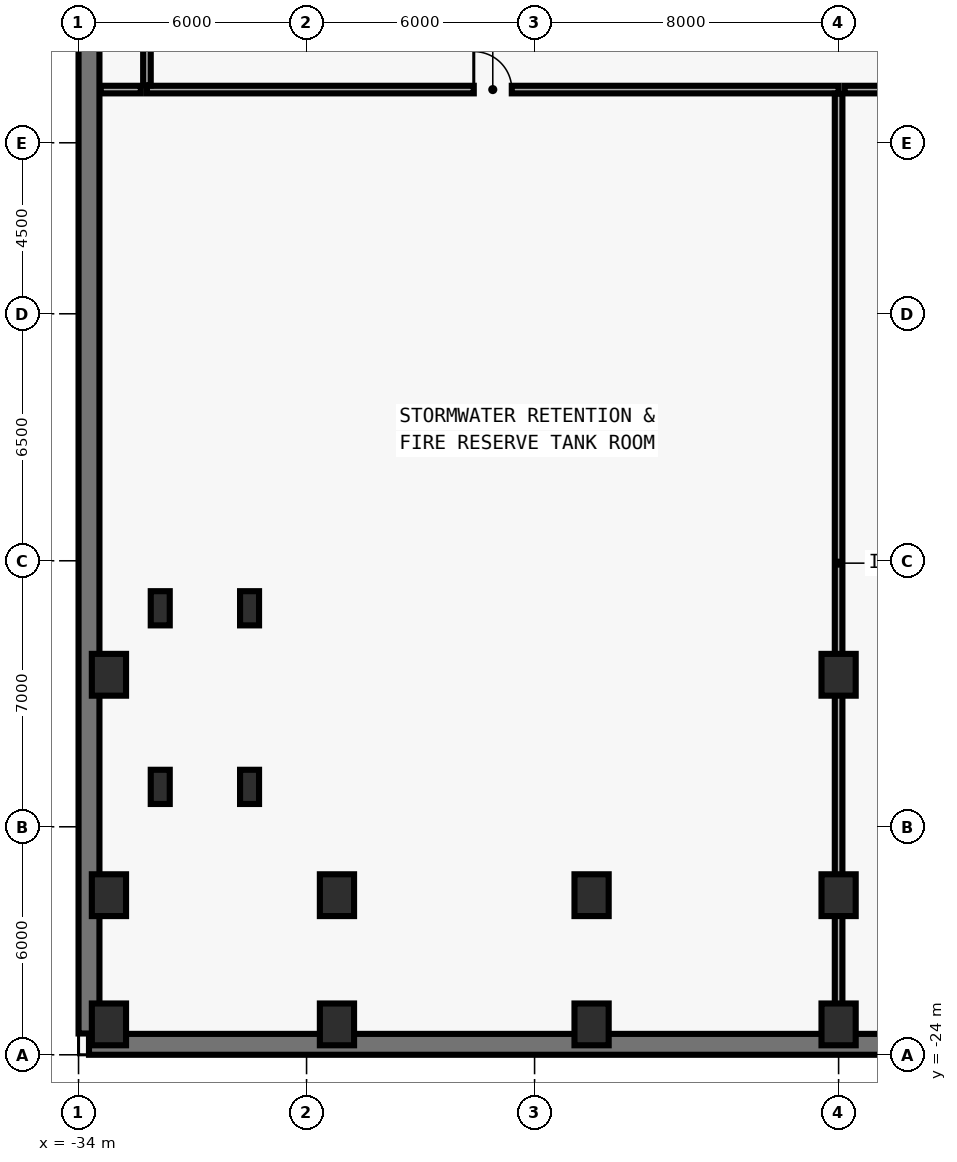
"""IFC4 building model, lengths in metres.
Left out: names, types, materials, properties, quantities, classifications, styles, units other than length and angle.
Written with IfcOpenShell. Run it as: python <this file> out.ifc"""

import sys

from ifc_helpers import new_model, si_unit, direction, frame, frame_2d, origin, origin_2d, place, context, subcontext, project, spatial, rectangle, extrude, element, fill, save


model = new_model("IFC4")
c1 = context("Model", 3, precision=1e-05, world=origin(), true_north=direction((0.0, 1.0)))
c2 = subcontext(c1, "Body", "Model", "MODEL_VIEW")
j1 = project(units=[si_unit("LENGTHUNIT", "METRE"), si_unit("PLANEANGLEUNIT", "RADIAN")], contexts=[c1])
p1 = place(None, origin())
s1 = spatial("IfcSite", under=j1, at=p1, CompositionType="ELEMENT")
p2 = place(p1, origin())
s2 = spatial("IfcBuilding", under=s1, at=p2, CompositionType="ELEMENT")
p3 = place(p2, frame((0.0, 0.0, -13.5)))
s3 = spatial("IfcBuildingStorey", under=s2, at=p3, CompositionType="ELEMENT", Elevation=-13.5)
p4 = place(p3, frame((-33.725, -23.725, 0.0), z_axis=(0.0, 0.0, 1.0), x_axis=(1.0, 0.0, 0.0)))
e1 = element("IfcWall", 1, at=p4, inside=s3, PredefinedType="SOLIDWALL", context=c2, shape_type="SweptSolid", body=[
    extrude(rectangle(XDim=67.45, YDim=0.55, at=frame_2d((33.725, 0.0))), origin(), (0.0, 0.0, 1.0), 4.492),
])
p5 = place(p3, frame((-33.725, -23.44, 0.0), z_axis=(0.0, 0.0, 1.0), x_axis=(0.0, 1.0, 0.0)))
e2 = element("IfcWall", 2, at=p5, inside=s3, PredefinedType="SOLIDWALL", context=c2, shape_type="SweptSolid", body=[
    extrude(rectangle(XDim=46.88, YDim=0.55, at=frame_2d((23.44, 0.0))), origin(), (0.0, 0.0, 1.0), 4.492),
])
for number, where, z_axis, x_axis in (
    (3, (-31.85, -16.95, 0.0), (0.0, 0.0, 1.0), (1.0, 0.0, 0.0)),
    (4, (-29.5, -16.95, 0.0), (0.0, 0.0, 1.0), (1.0, 0.0, 0.0)),
    (5, (-31.85, -12.25, 0.0), (0.0, 0.0, 1.0), (1.0, 0.0, 0.0)),
    (6, (-29.5, -12.25, 0.0), (0.0, 0.0, 1.0), (1.0, 0.0, 0.0)),
):
    element("IfcColumn", number, at=place(p3, frame(where, z_axis=z_axis, x_axis=x_axis)), inside=s3, PredefinedType="COLUMN", context=c2, shape_type="SweptSolid", body=[
        extrude(rectangle(XDim=0.5, YDim=0.9, at=origin_2d()), origin(), (0.0, 0.0, 1.0), 4.492),
    ])
for number, where, z_axis, x_axis in (
    (7, (-33.2, -23.2, 0.0), (0.0, 0.0, 1.0), (1.0, 0.0, 0.0)),
    (8, (-33.2, -19.8, 0.0), (0.0, 0.0, 1.0), (1.0, 0.0, 0.0)),
    (9, (-33.2, -14.0, 0.0), (0.0, 0.0, 1.0), (1.0, 0.0, 0.0)),
    (10, (-27.2, -23.2, 0.0), (0.0, 0.0, 1.0), (1.0, 0.0, 0.0)),
    (11, (-27.2, -19.8, 0.0), (0.0, 0.0, 1.0), (1.0, 0.0, 0.0)),
    (12, (-20.5, -23.2, 0.0), (0.0, 0.0, 1.0), (1.0, 0.0, 0.0)),
    (13, (-20.5, -19.8, 0.0), (0.0, 0.0, 1.0), (1.0, 0.0, 0.0)),
    (14, (-14.0, -23.2, 0.0), (0.0, 0.0, 1.0), (1.0, 0.0, 0.0)),
    (15, (-14.0, -19.8, 0.0), (0.0, 0.0, 1.0), (1.0, 0.0, 0.0)),
    (16, (-14.0, -14.0, 0.0), (0.0, 0.0, 1.0), (1.0, 0.0, 0.0)),
):
    element("IfcColumn", number, at=place(p3, frame(where, z_axis=z_axis, x_axis=x_axis)), inside=s3, PredefinedType="COLUMN", context=c2, shape_type="SweptSolid", body=[
        extrude(rectangle(XDim=0.9, YDim=1.1, at=origin_2d()), origin(), (0.0, 0.0, 1.0), 4.475),
    ])
p6 = place(p3, frame((-32.2, 1.4, 0.0), z_axis=(0.0, 0.0, 1.0), x_axis=(1.0, 0.0, 0.0)))
e17 = element("IfcWall", 17, at=p6, inside=s3, PredefinedType="MOVABLE", context=c2, shape_type="SweptSolid", body=[
    extrude(rectangle(XDim=18.2, YDim=0.2, at=frame_2d((9.1, 0.0))), origin(), (0.0, 0.0, 1.0), 4.18),
])
p7 = place(p6, frame((8.6, 0.0, 0.0)))
e18 = element("IfcOpeningElement", 18, at=p7, cuts=e17, PredefinedType="OPENING", context=c2, shape_type="SweptSolid", body=[
    extrude(rectangle(XDim=1.0, YDim=2.1, at=frame_2d((0.5, 1.05))), frame((0.0, 0.11, 0.0), z_axis=(0.0, -1.0, 0.0), x_axis=(1.0, 0.0, 0.0)), (0.0, 0.0, 1.0), 0.22),
])
p8 = place(p3, frame((-13.84, 1.4, 0.0), z_axis=(0.0, 0.0, 1.0), x_axis=(1.0, 0.0, 0.0)))
e19 = element("IfcWall", 19, at=p8, inside=s3, PredefinedType="MOVABLE", context=c2, shape_type="SweptSolid", body=[
    extrude(rectangle(XDim=9.24, YDim=0.2, at=frame_2d((4.62, 0.0))), origin(), (0.0, 0.0, 1.0), 4.18),
])
p9 = place(p8, frame((4.04, 0.0, 0.0)))
e20 = element("IfcOpeningElement", 20, at=p9, cuts=e19, PredefinedType="OPENING", context=c2, shape_type="SweptSolid", body=[
    extrude(rectangle(XDim=1.0, YDim=2.1, at=frame_2d((0.5, 1.05))), frame((0.0, 0.11, 0.0), z_axis=(0.0, -1.0, 0.0), x_axis=(1.0, 0.0, 0.0)), (0.0, 0.0, 1.0), 0.22),
])
p10 = place(p3, frame((-32.2, 3.69, 0.0), z_axis=(0.0, 0.0, 1.0), x_axis=(0.0, -1.0, 0.0)))
e21 = element("IfcWall", 21, at=p10, inside=s3, PredefinedType="MOVABLE", context=c2, shape_type="SweptSolid", body=[
    extrude(rectangle(XDim=2.18, YDim=0.2, at=frame_2d((1.09, 0.0))), origin(), (0.0, 0.0, 1.0), 4.18),
])
p11 = place(p3, frame((-14.0, 1.29, 0.0), z_axis=(0.0, 0.0, 1.0), x_axis=(0.0, -1.0, 0.0)))
e22 = element("IfcWall", 22, at=p11, inside=s3, PredefinedType="MOVABLE", context=c2, shape_type="SweptSolid", body=[
    extrude(rectangle(XDim=24.705, YDim=0.2, at=frame_2d((12.353, 0.0))), origin(), (0.0, 0.0, 1.0), 3.462),
])
p12 = place(p3, frame((-33.415, 1.4, 0.0), z_axis=(0.0, 0.0, 1.0), x_axis=(1.0, 0.0, 0.0)))
e23 = element("IfcWall", 23, at=p12, inside=s3, PredefinedType="MOVABLE", context=c2, shape_type="SweptSolid", body=[
    extrude(rectangle(XDim=1.055, YDim=0.2, at=frame_2d((0.527, 0.0))), origin(), (0.0, 0.0, 1.0), 4.18),
])
p13 = place(p7, origin())
e24 = element("IfcDoor", 24, at=p13, inside=s3, OperationType="SINGLE_SWING_LEFT", PredefinedType="DOOR", context=c2, shape_type="SweptSolid", body=[
    extrude(rectangle(XDim=1.0, YDim=2.1, at=frame_2d((0.5, 1.05))), frame((0.0, 0.025, 0.0), z_axis=(0.0, -1.0, 0.0), x_axis=(1.0, 0.0, 0.0)), (0.0, 0.0, 1.0), 0.05),
])
fill(e18, e24)
save(model, sys.argv[1])
